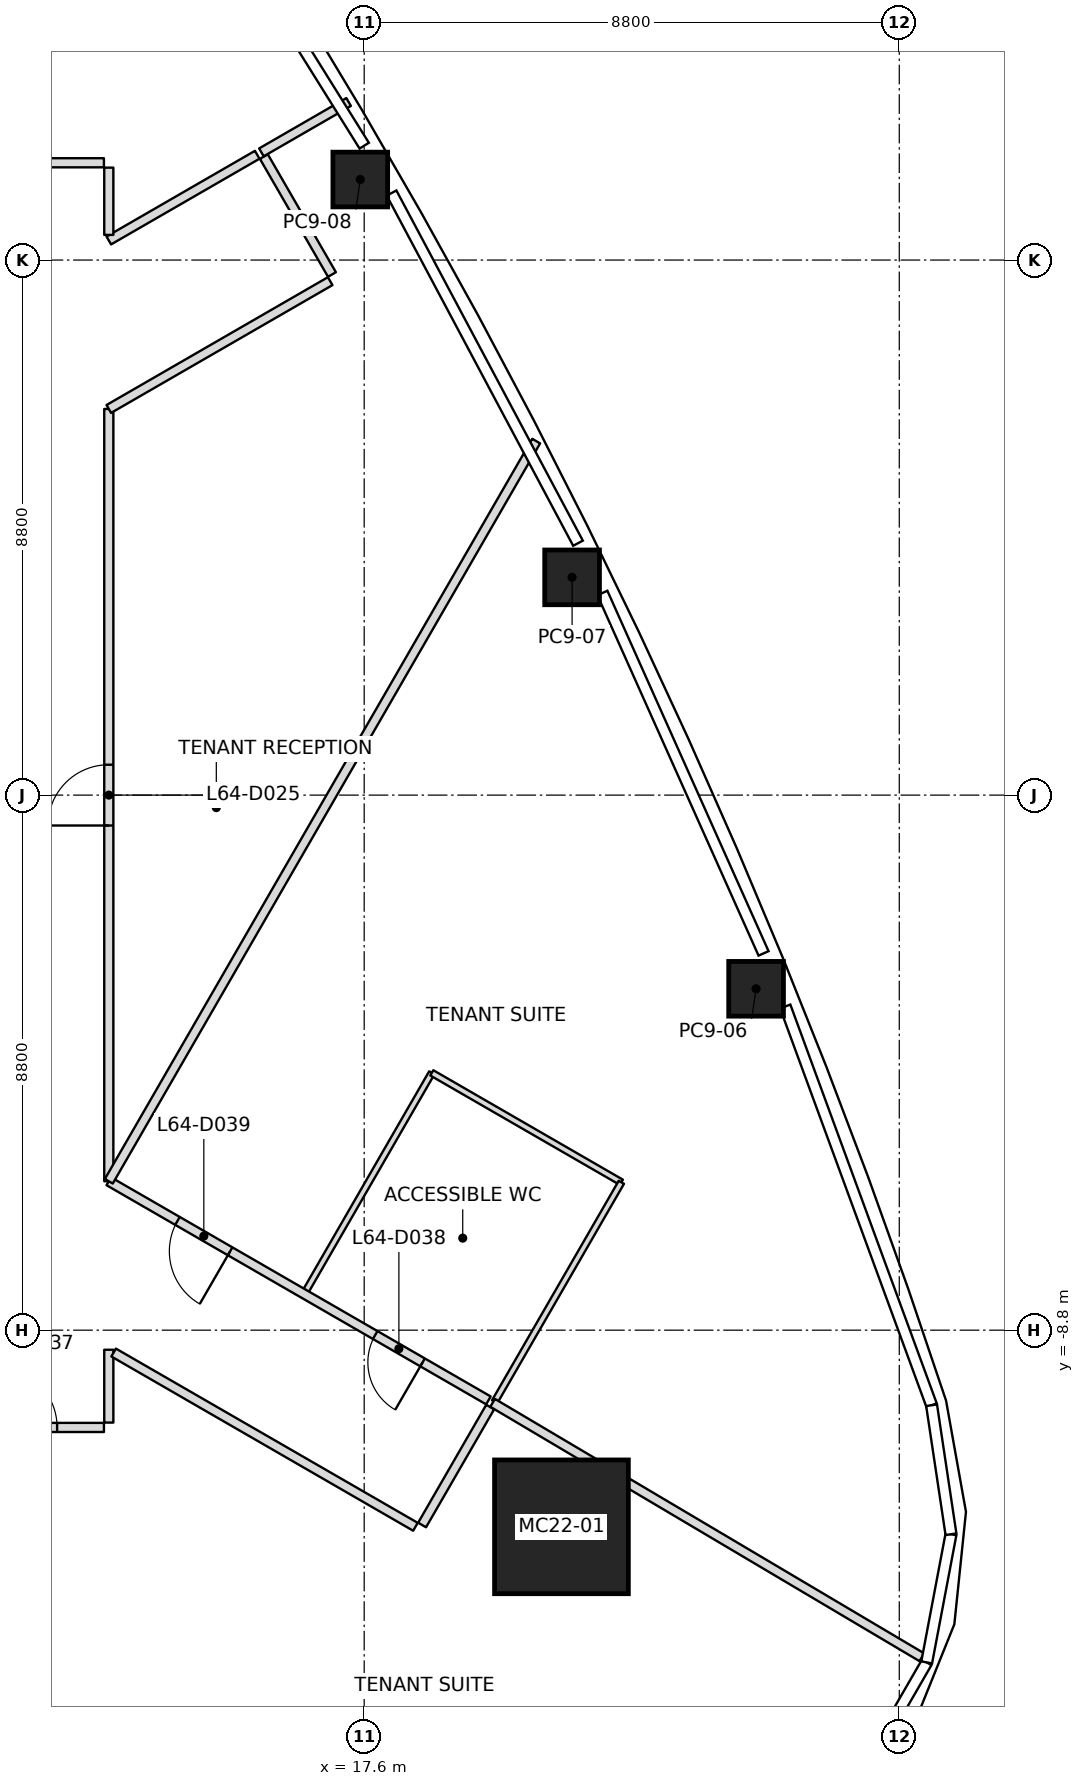
"""IFC4 building model, lengths in metres.
Left out: names, types, materials, properties, quantities, classifications, styles, units other than length and angle.
Written with IfcOpenShell. Run it as: python <this file> out.ifc"""

import sys

from ifc_helpers import new_model, si_unit, direction, frame, frame_2d, origin, origin_2d, place, context, subcontext, project, spatial, rectangle, extrude, element, fill, save


model = new_model("IFC4")
c1 = context("Model", 3, precision=1e-05, world=origin(), true_north=direction((0.0, 1.0)))
c2 = subcontext(c1, "Body", "Model", "MODEL_VIEW")
j1 = project(units=[si_unit("LENGTHUNIT", "METRE"), si_unit("PLANEANGLEUNIT", "RADIAN")], contexts=[c1])
p1 = place(None, origin())
s1 = spatial("IfcSite", under=j1, at=p1, CompositionType="ELEMENT")
p2 = place(p1, origin())
s2 = spatial("IfcBuilding", under=s1, at=p2, CompositionType="ELEMENT")
p3 = place(p2, frame((0.0, 0.0, 283.0)))
s3 = spatial("IfcBuildingStorey", under=s2, at=p3, CompositionType="ELEMENT", Elevation=283.0)
p4 = place(p3, frame((20.844, -12.034, 0.0), z_axis=(-0.027756720281, 0.01604399436, 0.999485945236), x_axis=(0.999614708015, 0.000445500311, 0.027753144871)))
e1 = element("IfcColumn", 1, at=p4, inside=s3, PredefinedType="COLUMN", context=c2, shape_type="SweptSolid", body=[
    extrude(rectangle(XDim=2.2, YDim=2.2, at=origin_2d()), origin(), (0.0, 0.0, 1.0), 4.002),
])
p5 = place(p3, frame((24.045, -3.186, 0.0), z_axis=(-0.017757551143, 0.009946669541, 0.999792845115), x_axis=(-0.376533551253, 0.92626647535, -0.015902874689)))
e2 = element("IfcColumn", 2, at=p5, inside=s3, PredefinedType="COLUMN", context=c2, shape_type="SweptSolid", body=[
    extrude(rectangle(XDim=0.9, YDim=0.9, at=origin_2d()), origin(), (0.0, 0.0, 1.0), 4.001),
])
p6 = place(p3, frame((21.019, 3.581, 0.0), z_axis=(-0.014036674448, 0.002013957638, 0.999899452818), x_axis=(-0.43929078876, 0.898309514635, -0.007976141077)))
e3 = element("IfcColumn", 3, at=p6, inside=s3, PredefinedType="COLUMN", context=c2, shape_type="SweptSolid", body=[
    extrude(rectangle(XDim=0.9, YDim=0.9, at=origin_2d()), origin(), (0.0, 0.0, 1.0), 4.0),
])
p7 = place(p3, frame((17.536, 10.124, 0.0), z_axis=(-0.009948074445, -0.005736926367, 0.999934059571), x_axis=(-0.499975258342, 0.8660396879, -5.385525e-06)))
e4 = element("IfcColumn", 4, at=p7, inside=s3, PredefinedType="COLUMN", context=c2, shape_type="SweptSolid", body=[
    extrude(rectangle(XDim=0.9, YDim=0.9, at=origin_2d()), origin(), (0.0, 0.0, 1.0), 4.0),
])
p8 = place(p3, frame((20.428, 5.823, 0.0), z_axis=(0.0, 0.0, 1.0), x_axis=(-0.500002095642, -0.866024193862, 0.0)))
e5 = element("IfcWall", 5, at=p8, inside=s3, PredefinedType="PARTITIONING", context=c2, shape_type="SweptSolid", body=[
    extrude(rectangle(XDim=14.057, YDim=0.15, at=frame_2d((7.028, 0.0))), origin(), (0.0, 0.0, 1.0), 3.234),
])
p9 = place(p3, frame((15.91, 10.571, 0.0), z_axis=(0.0, 0.0, 1.0), x_axis=(0.865947382072, 0.500135113228, 0.0)))
e6 = element("IfcWall", 6, at=p9, inside=s3, PredefinedType="PARTITIONING", context=c2, shape_type="SweptSolid", body=[
    extrude(rectangle(XDim=1.656, YDim=0.15, at=frame_2d((0.828, 0.0))), origin(), (0.0, 0.0, 1.0), 3.234),
])
p10 = place(p3, frame((19.712, -9.995, 0.0), z_axis=(0.0, 0.0, 1.0), x_axis=(0.860200661958, -0.509955705104, 0.0)))
e7 = element("IfcWall", 7, at=p10, inside=s3, PredefinedType="PARTITIONING", context=c2, shape_type="SweptSolid", body=[
    extrude(rectangle(XDim=8.206, YDim=0.15, at=frame_2d((4.103, 0.0))), origin(), (0.0, 0.0, 1.0), 3.234),
])
p11 = place(p3, frame((1.2, -10.4, 0.0), z_axis=(0.0, 0.0, 1.0), x_axis=(1.0, 0.0, 0.0)))
e8 = element("IfcWall", 8, at=p11, inside=s3, PredefinedType="PARTITIONING", context=c2, shape_type="SweptSolid", body=[
    extrude(rectangle(XDim=12.12, YDim=0.15, at=frame_2d((6.06, 0.0))), origin(), (0.0, 0.0, 1.0), 3.393),
])
p12 = place(p11, frame((6.85, 0.0, 0.0)))
e9 = element("IfcOpeningElement", 9, at=p12, cuts=e8, PredefinedType="OPENING", context=c2, shape_type="SweptSolid", body=[
    extrude(rectangle(XDim=0.9, YDim=2.1, at=frame_2d((0.45, 1.05))), frame((0.0, 0.075, 0.0), z_axis=(0.0, -1.0, 0.0), x_axis=(1.0, 0.0, 0.0)), (0.0, 0.0, 1.0), 0.15),
])
p13 = place(p11, frame((10.35, 0.0, 0.0)))
e10 = element("IfcOpeningElement", 10, at=p13, cuts=e8, PredefinedType="OPENING", context=c2, shape_type="SweptSolid", body=[
    extrude(rectangle(XDim=1.0, YDim=2.1, at=frame_2d((0.5, 1.05))), frame((0.0, 0.075, 0.0), z_axis=(0.0, -1.0, 0.0), x_axis=(1.0, 0.0, 0.0)), (0.0, 0.0, 1.0), 0.15),
])
p14 = place(p3, frame((13.32, 10.4, 0.0), z_axis=(0.0, 0.0, 1.0), x_axis=(-1.0, 0.0, 0.0)))
e11 = element("IfcWall", 11, at=p14, inside=s3, PredefinedType="PARTITIONING", context=c2, shape_type="SweptSolid", body=[
    extrude(rectangle(XDim=5.12, YDim=0.15, at=frame_2d((2.56, 0.0))), origin(), (0.0, 0.0, 1.0), 3.443),
])
p15 = place(p14, frame((2.02, 0.0, 0.0)))
e12 = element("IfcOpeningElement", 12, at=p15, cuts=e11, PredefinedType="OPENING", context=c2, shape_type="SweptSolid", body=[
    extrude(rectangle(XDim=1.0, YDim=2.1, at=frame_2d((0.5, 1.05))), frame((0.0, 0.075, 0.0), z_axis=(0.0, -1.0, 0.0), x_axis=(1.0, 0.0, 0.0)), (0.0, 0.0, 1.0), 0.15),
])
p16 = place(p3, frame((13.4, -10.32, 0.0), z_axis=(0.0, 0.0, 1.0), x_axis=(0.0, 1.0, 0.0)))
e13 = element("IfcWall", 13, at=p16, inside=s3, PredefinedType="PARTITIONING", context=c2, shape_type="SweptSolid", body=[
    extrude(rectangle(XDim=1.198, YDim=0.15, at=frame_2d((0.599, 0.0))), origin(), (0.0, 0.0, 1.0), 3.233),
])
p17 = place(p3, frame((13.479, -9.168, 0.0), z_axis=(0.0, 0.0, 1.0), x_axis=(0.866038050133, -0.499978095242, 0.0)))
e14 = element("IfcWall", 14, at=p17, inside=s3, PredefinedType="PARTITIONING", context=c2, shape_type="SweptSolid", body=[
    extrude(rectangle(XDim=5.732, YDim=0.15, at=frame_2d((2.866, 0.0))), origin(), (0.0, 0.0, 1.0), 3.233),
])
p18 = place(p3, frame((13.4, -6.351, 0.0), z_axis=(0.0, 0.0, 1.0), x_axis=(0.0, 1.0, 0.0)))
e15 = element("IfcWall", 15, at=p18, inside=s3, PredefinedType="PARTITIONING", context=c2, shape_type="SweptSolid", body=[
    extrude(rectangle(XDim=12.702, YDim=0.15, at=frame_2d((6.351, 0.0))), origin(), (0.0, 0.0, 1.0), 3.317),
])
p19 = place(p18, frame((5.851, 0.0, 0.0)))
e16 = element("IfcOpeningElement", 16, at=p19, cuts=e15, PredefinedType="OPENING", context=c2, shape_type="SweptSolid", body=[
    extrude(rectangle(XDim=1.0, YDim=2.1, at=frame_2d((0.5, 1.05))), frame((0.0, 0.075, 0.0), z_axis=(0.0, -1.0, 0.0), x_axis=(1.0, 0.0, 0.0)), (0.0, 0.0, 1.0), 0.15),
])
p20 = place(p3, frame((13.4, 6.351, 0.0), z_axis=(0.0, 0.0, 1.0), x_axis=(0.866026021477, 0.499998930123, 0.0)))
e17 = element("IfcWall", 17, at=p20, inside=s3, PredefinedType="PARTITIONING", context=c2, shape_type="SweptSolid", body=[
    extrude(rectangle(XDim=4.204, YDim=0.15, at=frame_2d((2.102, 0.0))), origin(), (0.0, 0.0, 1.0), 3.45),
])
p21 = place(p3, frame((19.643, -9.955, 0.0), z_axis=(0.0, 0.0, 1.0), x_axis=(-0.866040084029, 0.499974572209, 0.0)))
e18 = element("IfcWall", 18, at=p21, inside=s3, PredefinedType="PARTITIONING", context=c2, shape_type="SweptSolid", body=[
    extrude(rectangle(XDim=7.209, YDim=0.15, at=frame_2d((3.604, 0.0))), origin(), (0.0, 0.0, 1.0), 3.317),
])
p22 = place(p21, frame((1.25, 0.0, 0.0)))
e19 = element("IfcOpeningElement", 19, at=p22, cuts=e18, PredefinedType="OPENING", context=c2, shape_type="SweptSolid", body=[
    extrude(rectangle(XDim=0.9, YDim=2.1, at=frame_2d((0.45, 1.05))), frame((0.0, 0.075, 0.0), z_axis=(0.0, -1.0, 0.0), x_axis=(1.0, 0.0, 0.0)), (0.0, 0.0, 1.0), 0.15),
])
p23 = place(p21, frame((4.904, 0.0, 0.0)))
e20 = element("IfcOpeningElement", 20, at=p23, cuts=e18, PredefinedType="OPENING", context=c2, shape_type="SweptSolid", body=[
    extrude(rectangle(XDim=1.0, YDim=2.1, at=frame_2d((0.5, 1.05))), frame((0.0, 0.075, 0.0), z_axis=(0.0, -1.0, 0.0), x_axis=(1.0, 0.0, 0.0)), (0.0, 0.0, 1.0), 0.15),
])
p24 = place(p3, frame((15.841, 10.531, 0.0), z_axis=(0.0, 0.0, 1.0), x_axis=(-0.866038455972, -0.499977392266, 0.0)))
e21 = element("IfcWall", 21, at=p24, inside=s3, PredefinedType="PARTITIONING", context=c2, shape_type="SweptSolid", body=[
    extrude(rectangle(XDim=2.819, YDim=0.15, at=frame_2d((1.409, 0.0))), origin(), (0.0, 0.0, 1.0), 3.45),
])
p25 = place(p3, frame((13.4, 9.214, 0.0), z_axis=(0.0, 0.0, 1.0), x_axis=(0.0, 1.0, 0.0)))
e22 = element("IfcWall", 22, at=p25, inside=s3, PredefinedType="PARTITIONING", context=c2, shape_type="SweptSolid", body=[
    extrude(rectangle(XDim=1.106, YDim=0.15, at=frame_2d((0.553, 0.0))), origin(), (0.0, 0.0, 1.0), 3.45),
])
p26 = place(p3, frame((17.07, 8.562, 0.0), z_axis=(0.0, 0.0, 1.0), x_axis=(-0.49994888933, 0.866054910533, 0.0)))
e23 = element("IfcWall", 23, at=p26, inside=s3, PredefinedType="PARTITIONING", context=c2, shape_type="SweptSolid", body=[
    extrude(rectangle(XDim=2.24, YDim=0.15, at=frame_2d((1.12, 0.0))), origin(), (0.0, 0.0, 1.0), 3.45),
])
p27 = place(p3, frame((18.552, -12.004, 0.0), z_axis=(0.0, 0.0, 1.0), x_axis=(0.500030632641, 0.866007717299, 0.0)))
e24 = element("IfcWall", 24, at=p27, inside=s3, PredefinedType="PARTITIONING", context=c2, shape_type="SweptSolid", body=[
    extrude(rectangle(XDim=2.24, YDim=0.15, at=frame_2d((1.12, 0.0))), origin(), (0.0, 0.0, 1.0), 3.233),
])
p28 = place(p3, frame((16.627, -8.179, 0.0), z_axis=(0.0, 0.0, 1.0), x_axis=(0.499992746786, 0.866029591389, 0.0)))
e25 = element("IfcWall", 25, at=p28, inside=s3, PredefinedType="PARTITIONING", context=c2, shape_type="SweptSolid", body=[
    extrude(rectangle(XDim=4.17, YDim=0.1, at=frame_2d((2.085, 0.0))), origin(), (0.0, 0.0, 1.0), 3.45),
])
p29 = place(p3, frame((18.712, -4.568, 0.0), z_axis=(0.0, 0.0, 1.0), x_axis=(0.866018442252, -0.500012057535, 0.0)))
e26 = element("IfcWall", 26, at=p29, inside=s3, PredefinedType="PARTITIONING", context=c2, shape_type="SweptSolid", body=[
    extrude(rectangle(XDim=3.6, YDim=0.1, at=frame_2d((1.8, 0.0))), origin(), (0.0, 0.0, 1.0), 3.443),
])
p30 = place(p3, frame((21.83, -6.368, 0.0), z_axis=(0.0, 0.0, 1.0), x_axis=(-0.499992746786, -0.866029591389, 0.0)))
e27 = element("IfcWall", 27, at=p30, inside=s3, PredefinedType="PARTITIONING", context=c2, shape_type="SweptSolid", body=[
    extrude(rectangle(XDim=4.17, YDim=0.1, at=frame_2d((2.085, 0.0))), origin(), (0.0, 0.0, 1.0), 3.45),
])
p31 = place(p19, origin())
e28 = element("IfcDoor", 28, at=p31, inside=s3, OperationType="SINGLE_SWING_RIGHT", PredefinedType="DOOR", context=c2, shape_type="SweptSolid", body=[
    extrude(rectangle(XDim=1.0, YDim=2.1, at=frame_2d((0.5, 1.05))), frame((0.0, 0.025, 0.0), z_axis=(0.0, -1.0, 0.0), x_axis=(1.0, 0.0, 0.0)), (0.0, 0.0, 1.0), 0.05),
])
fill(e16, e28)
p32 = place(p13, origin())
e29 = element("IfcDoor", 29, at=p32, inside=s3, OperationType="SINGLE_SWING_RIGHT", PredefinedType="DOOR", context=c2, shape_type="SweptSolid", body=[
    extrude(rectangle(XDim=1.0, YDim=2.1, at=frame_2d((0.5, 1.05))), frame((0.0, 0.025, 0.0), z_axis=(0.0, -1.0, 0.0), x_axis=(1.0, 0.0, 0.0)), (0.0, 0.0, 1.0), 0.05),
])
fill(e10, e29)
p33 = place(p22, origin())
e30 = element("IfcDoor", 30, at=p33, inside=s3, OperationType="SINGLE_SWING_RIGHT", PredefinedType="DOOR", context=c2, shape_type="SweptSolid", body=[
    extrude(rectangle(XDim=0.9, YDim=2.1, at=frame_2d((0.45, 1.05))), frame((0.0, 0.025, 0.0), z_axis=(0.0, -1.0, 0.0), x_axis=(1.0, 0.0, 0.0)), (0.0, 0.0, 1.0), 0.05),
])
fill(e19, e30)
p34 = place(p23, origin())
e31 = element("IfcDoor", 31, at=p34, inside=s3, OperationType="SINGLE_SWING_RIGHT", PredefinedType="DOOR", context=c2, shape_type="SweptSolid", body=[
    extrude(rectangle(XDim=1.0, YDim=2.1, at=frame_2d((0.5, 1.05))), frame((0.0, 0.025, 0.0), z_axis=(0.0, -1.0, 0.0), x_axis=(1.0, 0.0, 0.0)), (0.0, 0.0, 1.0), 0.05),
])
fill(e20, e31)
save(model, sys.argv[1])
